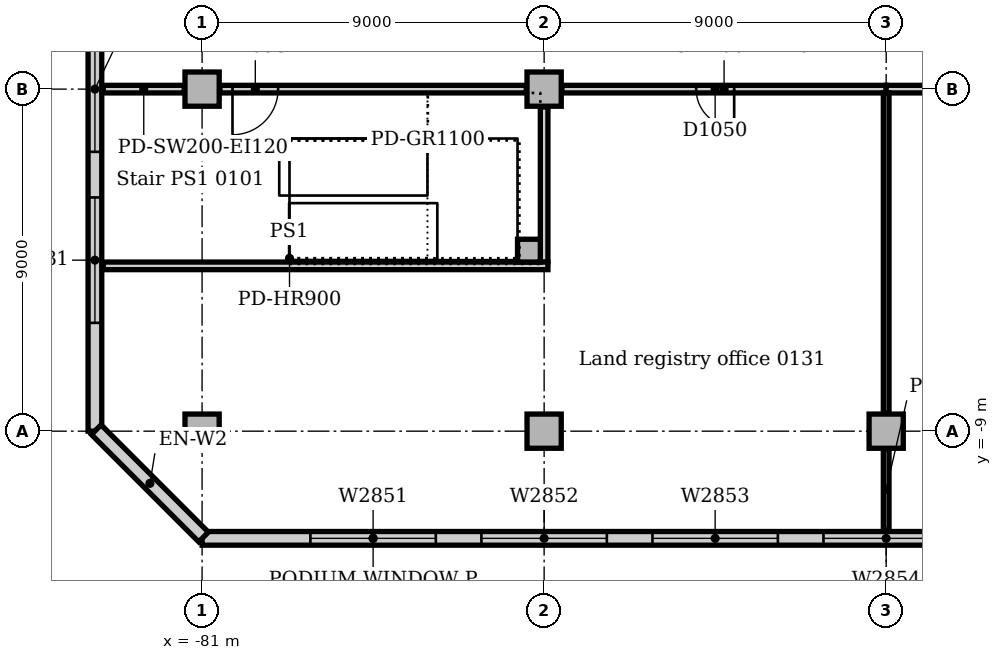
"""IFC4 building model, lengths in metres.
Left out: names, types, materials, properties, quantities, classifications, styles, units other than length and angle.
Written with IfcOpenShell. Run it as: python <this file> out.ifc"""

import sys

from ifc_helpers import new_model, si_unit, direction, frame, frame_2d, origin, origin_2d, place, context, subcontext, project, spatial, rectangle, extrude, element, fill, save


model = new_model("IFC4")
c1 = context("Model", 3, precision=1e-05, world=origin(), true_north=direction((0.0, 1.0)))
c2 = subcontext(c1, "Body", "Model", "MODEL_VIEW")
j1 = project(units=[si_unit("LENGTHUNIT", "METRE"), si_unit("PLANEANGLEUNIT", "RADIAN")], contexts=[c1])
p1 = place(None, origin())
s1 = spatial("IfcSite", under=j1, at=p1, CompositionType="ELEMENT")
p2 = place(p1, origin())
s2 = spatial("IfcBuilding", under=s1, at=p2, CompositionType="ELEMENT")
p3 = place(p2, frame((0.0, 0.0, 6.0)))
s3 = spatial("IfcBuildingStorey", under=s2, at=p3, CompositionType="ELEMENT", Elevation=6.0)
for number, where, z_axis, x_axis in (
    (1, (-81.0, -9.0, 0.0), (0.0, 0.0, 1.0), (1.0, 0.0, 0.0)),
    (2, (-81.0, 0.0, 0.0), (0.0, 0.0, 1.0), (1.0, 0.0, 0.0)),
    (3, (-72.0, -9.0, 0.0), (0.0, 0.0, 1.0), (1.0, 0.0, 0.0)),
    (4, (-72.0, 0.0, 0.0), (0.0, 0.0, 1.0), (1.0, 0.0, 0.0)),
    (5, (-63.0, -9.0, 0.0), (0.0, 0.0, 1.0), (1.0, 0.0, 0.0)),
):
    element("IfcColumn", number, at=place(p3, frame(where, z_axis=z_axis, x_axis=x_axis)), inside=s3, PredefinedType="COLUMN", context=c2, shape_type="SweptSolid", body=[
        extrude(rectangle(XDim=0.9, YDim=0.9, at=origin_2d()), origin(), (0.0, 0.0, 1.0), 4.7),
    ])
p4 = place(p3, frame((-81.0, -11.82, 0.0), z_axis=(0.0, 0.0, 1.0), x_axis=(1.0, 0.0, 0.0)))
e6 = element("IfcWall", 6, at=p4, inside=s3, PredefinedType="STANDARD", context=c2, shape_type="SweptSolid", body=[
    extrude(rectangle(XDim=54.0, YDim=0.36, at=frame_2d((27.0, 0.0))), origin(), (0.0, 0.0, 1.0), 4.7),
])
p5 = place(p4, frame((2.85, 0.0, 0.9)))
e7 = element("IfcOpeningElement", 7, at=p5, cuts=e6, PredefinedType="OPENING", context=c2, shape_type="SweptSolid", body=[
    extrude(rectangle(XDim=3.3, YDim=2.4, at=frame_2d((1.65, 1.2))), frame((0.0, 0.19, 0.0), z_axis=(0.0, -1.0, 0.0), x_axis=(1.0, 0.0, 0.0)), (0.0, 0.0, 1.0), 0.38),
])
p6 = place(p4, frame((7.35, 0.0, 0.9)))
e8 = element("IfcOpeningElement", 8, at=p6, cuts=e6, PredefinedType="OPENING", context=c2, shape_type="SweptSolid", body=[
    extrude(rectangle(XDim=3.3, YDim=2.4, at=frame_2d((1.65, 1.2))), frame((0.0, 0.19, 0.0), z_axis=(0.0, -1.0, 0.0), x_axis=(1.0, 0.0, 0.0)), (0.0, 0.0, 1.0), 0.38),
])
p7 = place(p4, frame((11.85, 0.0, 0.9)))
e9 = element("IfcOpeningElement", 9, at=p7, cuts=e6, PredefinedType="OPENING", context=c2, shape_type="SweptSolid", body=[
    extrude(rectangle(XDim=3.3, YDim=2.4, at=frame_2d((1.65, 1.2))), frame((0.0, 0.19, 0.0), z_axis=(0.0, -1.0, 0.0), x_axis=(1.0, 0.0, 0.0)), (0.0, 0.0, 1.0), 0.38),
])
p8 = place(p4, frame((16.35, 0.0, 0.9)))
e10 = element("IfcOpeningElement", 10, at=p8, cuts=e6, PredefinedType="OPENING", context=c2, shape_type="SweptSolid", body=[
    extrude(rectangle(XDim=3.3, YDim=2.4, at=frame_2d((1.65, 1.2))), frame((0.0, 0.19, 0.0), z_axis=(0.0, -1.0, 0.0), x_axis=(1.0, 0.0, 0.0)), (0.0, 0.0, 1.0), 0.38),
])
p9 = place(p4, frame((20.85, 0.0, 0.9)))
e11 = element("IfcOpeningElement", 11, at=p9, cuts=e6, PredefinedType="OPENING", context=c2, shape_type="SweptSolid", body=[
    extrude(rectangle(XDim=3.3, YDim=2.4, at=frame_2d((1.65, 1.2))), frame((0.0, 0.19, 0.0), z_axis=(0.0, -1.0, 0.0), x_axis=(1.0, 0.0, 0.0)), (0.0, 0.0, 1.0), 0.38),
])
p10 = place(p4, frame((25.35, 0.0, 0.9)))
e12 = element("IfcOpeningElement", 12, at=p10, cuts=e6, PredefinedType="OPENING", context=c2, shape_type="SweptSolid", body=[
    extrude(rectangle(XDim=3.3, YDim=2.4, at=frame_2d((1.65, 1.2))), frame((0.0, 0.19, 0.0), z_axis=(0.0, -1.0, 0.0), x_axis=(1.0, 0.0, 0.0)), (0.0, 0.0, 1.0), 0.38),
])
p11 = place(p4, frame((29.85, 0.0, 0.9)))
e13 = element("IfcOpeningElement", 13, at=p11, cuts=e6, PredefinedType="OPENING", context=c2, shape_type="SweptSolid", body=[
    extrude(rectangle(XDim=3.3, YDim=2.4, at=frame_2d((1.65, 1.2))), frame((0.0, 0.19, 0.0), z_axis=(0.0, -1.0, 0.0), x_axis=(1.0, 0.0, 0.0)), (0.0, 0.0, 1.0), 0.38),
])
p12 = place(p4, frame((34.35, 0.0, 0.9)))
e14 = element("IfcOpeningElement", 14, at=p12, cuts=e6, PredefinedType="OPENING", context=c2, shape_type="SweptSolid", body=[
    extrude(rectangle(XDim=3.3, YDim=2.4, at=frame_2d((1.65, 1.2))), frame((0.0, 0.19, 0.0), z_axis=(0.0, -1.0, 0.0), x_axis=(1.0, 0.0, 0.0)), (0.0, 0.0, 1.0), 0.38),
])
p13 = place(p4, frame((38.85, 0.0, 0.9)))
e15 = element("IfcOpeningElement", 15, at=p13, cuts=e6, PredefinedType="OPENING", context=c2, shape_type="SweptSolid", body=[
    extrude(rectangle(XDim=3.3, YDim=2.4, at=frame_2d((1.65, 1.2))), frame((0.0, 0.19, 0.0), z_axis=(0.0, -1.0, 0.0), x_axis=(1.0, 0.0, 0.0)), (0.0, 0.0, 1.0), 0.38),
])
p14 = place(p4, frame((43.35, 0.0, 0.9)))
e16 = element("IfcOpeningElement", 16, at=p14, cuts=e6, PredefinedType="OPENING", context=c2, shape_type="SweptSolid", body=[
    extrude(rectangle(XDim=3.3, YDim=2.4, at=frame_2d((1.65, 1.2))), frame((0.0, 0.19, 0.0), z_axis=(0.0, -1.0, 0.0), x_axis=(1.0, 0.0, 0.0)), (0.0, 0.0, 1.0), 0.38),
])
p15 = place(p4, frame((47.85, 0.0, 0.9)))
e17 = element("IfcOpeningElement", 17, at=p15, cuts=e6, PredefinedType="OPENING", context=c2, shape_type="SweptSolid", body=[
    extrude(rectangle(XDim=3.3, YDim=2.4, at=frame_2d((1.65, 1.2))), frame((0.0, 0.19, 0.0), z_axis=(0.0, -1.0, 0.0), x_axis=(1.0, 0.0, 0.0)), (0.0, 0.0, 1.0), 0.38),
])
p16 = place(p3, frame((-83.82, 54.0, 0.0), z_axis=(0.0, 0.0, 1.0), x_axis=(0.0, -1.0, 0.0)))
e18 = element("IfcWall", 18, at=p16, inside=s3, PredefinedType="STANDARD", context=c2, shape_type="SweptSolid", body=[
    extrude(rectangle(XDim=63.0, YDim=0.36, at=frame_2d((31.5, 0.0))), origin(), (0.0, 0.0, 1.0), 4.7),
])
p17 = place(p16, frame((2.85, 0.0, 0.9)))
e19 = element("IfcOpeningElement", 19, at=p17, cuts=e18, PredefinedType="OPENING", context=c2, shape_type="SweptSolid", body=[
    extrude(rectangle(XDim=3.3, YDim=2.4, at=frame_2d((1.65, 1.2))), frame((0.0, 0.19, 0.0), z_axis=(0.0, -1.0, 0.0), x_axis=(1.0, 0.0, 0.0)), (0.0, 0.0, 1.0), 0.38),
])
p18 = place(p16, frame((7.35, 0.0, 0.9)))
e20 = element("IfcOpeningElement", 20, at=p18, cuts=e18, PredefinedType="OPENING", context=c2, shape_type="SweptSolid", body=[
    extrude(rectangle(XDim=3.3, YDim=2.4, at=frame_2d((1.65, 1.2))), frame((0.0, 0.19, 0.0), z_axis=(0.0, -1.0, 0.0), x_axis=(1.0, 0.0, 0.0)), (0.0, 0.0, 1.0), 0.38),
])
p19 = place(p16, frame((11.85, 0.0, 0.9)))
e21 = element("IfcOpeningElement", 21, at=p19, cuts=e18, PredefinedType="OPENING", context=c2, shape_type="SweptSolid", body=[
    extrude(rectangle(XDim=3.3, YDim=2.4, at=frame_2d((1.65, 1.2))), frame((0.0, 0.19, 0.0), z_axis=(0.0, -1.0, 0.0), x_axis=(1.0, 0.0, 0.0)), (0.0, 0.0, 1.0), 0.38),
])
p20 = place(p16, frame((16.35, 0.0, 0.9)))
e22 = element("IfcOpeningElement", 22, at=p20, cuts=e18, PredefinedType="OPENING", context=c2, shape_type="SweptSolid", body=[
    extrude(rectangle(XDim=3.3, YDim=2.4, at=frame_2d((1.65, 1.2))), frame((0.0, 0.19, 0.0), z_axis=(0.0, -1.0, 0.0), x_axis=(1.0, 0.0, 0.0)), (0.0, 0.0, 1.0), 0.38),
])
p21 = place(p16, frame((20.85, 0.0, 0.9)))
e23 = element("IfcOpeningElement", 23, at=p21, cuts=e18, PredefinedType="OPENING", context=c2, shape_type="SweptSolid", body=[
    extrude(rectangle(XDim=3.3, YDim=2.4, at=frame_2d((1.65, 1.2))), frame((0.0, 0.19, 0.0), z_axis=(0.0, -1.0, 0.0), x_axis=(1.0, 0.0, 0.0)), (0.0, 0.0, 1.0), 0.38),
])
p22 = place(p16, frame((25.35, 0.0, 0.9)))
e24 = element("IfcOpeningElement", 24, at=p22, cuts=e18, PredefinedType="OPENING", context=c2, shape_type="SweptSolid", body=[
    extrude(rectangle(XDim=3.3, YDim=2.4, at=frame_2d((1.65, 1.2))), frame((0.0, 0.19, 0.0), z_axis=(0.0, -1.0, 0.0), x_axis=(1.0, 0.0, 0.0)), (0.0, 0.0, 1.0), 0.38),
])
p23 = place(p16, frame((29.85, 0.0, 0.9)))
e25 = element("IfcOpeningElement", 25, at=p23, cuts=e18, PredefinedType="OPENING", context=c2, shape_type="SweptSolid", body=[
    extrude(rectangle(XDim=3.3, YDim=2.4, at=frame_2d((1.65, 1.2))), frame((0.0, 0.19, 0.0), z_axis=(0.0, -1.0, 0.0), x_axis=(1.0, 0.0, 0.0)), (0.0, 0.0, 1.0), 0.38),
])
p24 = place(p16, frame((34.35, 0.0, 0.9)))
e26 = element("IfcOpeningElement", 26, at=p24, cuts=e18, PredefinedType="OPENING", context=c2, shape_type="SweptSolid", body=[
    extrude(rectangle(XDim=3.3, YDim=2.4, at=frame_2d((1.65, 1.2))), frame((0.0, 0.19, 0.0), z_axis=(0.0, -1.0, 0.0), x_axis=(1.0, 0.0, 0.0)), (0.0, 0.0, 1.0), 0.38),
])
p25 = place(p16, frame((38.85, 0.0, 0.9)))
e27 = element("IfcOpeningElement", 27, at=p25, cuts=e18, PredefinedType="OPENING", context=c2, shape_type="SweptSolid", body=[
    extrude(rectangle(XDim=3.3, YDim=2.4, at=frame_2d((1.65, 1.2))), frame((0.0, 0.19, 0.0), z_axis=(0.0, -1.0, 0.0), x_axis=(1.0, 0.0, 0.0)), (0.0, 0.0, 1.0), 0.38),
])
p26 = place(p16, frame((43.35, 0.0, 0.9)))
e28 = element("IfcOpeningElement", 28, at=p26, cuts=e18, PredefinedType="OPENING", context=c2, shape_type="SweptSolid", body=[
    extrude(rectangle(XDim=3.3, YDim=2.4, at=frame_2d((1.65, 1.2))), frame((0.0, 0.19, 0.0), z_axis=(0.0, -1.0, 0.0), x_axis=(1.0, 0.0, 0.0)), (0.0, 0.0, 1.0), 0.38),
])
p27 = place(p16, frame((47.85, 0.0, 0.9)))
e29 = element("IfcOpeningElement", 29, at=p27, cuts=e18, PredefinedType="OPENING", context=c2, shape_type="SweptSolid", body=[
    extrude(rectangle(XDim=3.3, YDim=2.4, at=frame_2d((1.65, 1.2))), frame((0.0, 0.19, 0.0), z_axis=(0.0, -1.0, 0.0), x_axis=(1.0, 0.0, 0.0)), (0.0, 0.0, 1.0), 0.38),
])
p28 = place(p16, frame((52.35, 0.0, 0.9)))
e30 = element("IfcOpeningElement", 30, at=p28, cuts=e18, PredefinedType="OPENING", context=c2, shape_type="SweptSolid", body=[
    extrude(rectangle(XDim=3.3, YDim=2.4, at=frame_2d((1.65, 1.2))), frame((0.0, 0.19, 0.0), z_axis=(0.0, -1.0, 0.0), x_axis=(1.0, 0.0, 0.0)), (0.0, 0.0, 1.0), 0.38),
])
p29 = place(p16, frame((56.85, 0.0, 0.9)))
e31 = element("IfcOpeningElement", 31, at=p29, cuts=e18, PredefinedType="OPENING", context=c2, shape_type="SweptSolid", body=[
    extrude(rectangle(XDim=3.3, YDim=2.4, at=frame_2d((1.65, 1.2))), frame((0.0, 0.19, 0.0), z_axis=(0.0, -1.0, 0.0), x_axis=(1.0, 0.0, 0.0)), (0.0, 0.0, 1.0), 0.38),
])
p30 = place(p3, frame((-83.784, -8.961, 0.0), z_axis=(0.0, 0.0, 1.0), x_axis=(0.707106781187, -0.707106781187, 0.0)))
e32 = element("IfcWall", 32, at=p30, inside=s3, PredefinedType="STANDARD", context=c2, shape_type="SweptSolid", body=[
    extrude(rectangle(XDim=3.993, YDim=0.36, at=frame_2d((1.996, 0.0))), origin(), (0.0, 0.0, 1.0), 4.7),
])
p31 = place(p3, frame((-72.4, -4.25, 0.0), z_axis=(0.0, 0.0, 1.0), x_axis=(1.0, 0.0, 0.0)))
e33 = element("IfcColumn", 33, at=p31, inside=s3, PredefinedType="COLUMN", context=c2, shape_type="SweptSolid", body=[
    extrude(rectangle(XDim=0.6, YDim=0.6, at=origin_2d()), origin(), (0.0, 0.0, 1.0), 5.0),
])
p32 = place(p3, frame((-83.6, 0.0, 0.0), z_axis=(0.0, 0.0, 1.0), x_axis=(1.0, 0.0, 0.0)))
e34 = element("IfcWall", 34, at=p32, inside=s3, PredefinedType="SOLIDWALL", context=c2, shape_type="SweptSolid", body=[
    extrude(rectangle(XDim=2.13, YDim=0.2, at=frame_2d((1.065, 0.0))), origin(), (0.0, 0.0, 1.0), 4.7),
])
p33 = place(p3, frame((-80.53, 0.0, 0.0), z_axis=(0.0, 0.0, 1.0), x_axis=(1.0, 0.0, 0.0)))
e35 = element("IfcWall", 35, at=p33, inside=s3, PredefinedType="SOLIDWALL", context=c2, shape_type="SweptSolid", body=[
    extrude(rectangle(XDim=8.06, YDim=0.2, at=frame_2d((4.03, 0.0))), origin(), (0.0, 0.0, 1.0), 4.7),
])
p34 = place(p33, frame((0.33, 0.0, 0.0)))
e36 = element("IfcOpeningElement", 36, at=p34, cuts=e35, PredefinedType="OPENING", context=c2, shape_type="SweptSolid", body=[
    extrude(rectangle(XDim=1.2, YDim=2.1, at=frame_2d((0.6, 1.05))), frame((0.0, 0.11, 0.0), z_axis=(0.0, -1.0, 0.0), x_axis=(1.0, 0.0, 0.0)), (0.0, 0.0, 1.0), 0.22),
])
p35 = place(p3, frame((-72.0, -4.55, 0.0), z_axis=(0.0, 0.0, 1.0), x_axis=(0.0, 1.0, 0.0)))
e37 = element("IfcWall", 37, at=p35, inside=s3, PredefinedType="SOLIDWALL", context=c2, shape_type="SweptSolid", body=[
    extrude(rectangle(XDim=4.08, YDim=0.2, at=frame_2d((2.04, 0.0))), origin(), (0.0, 0.0, 1.0), 4.7),
])
p36 = place(p3, frame((-83.6, -4.65, 0.0), z_axis=(0.0, 0.0, 1.0), x_axis=(1.0, 0.0, 0.0)))
e38 = element("IfcWall", 38, at=p36, inside=s3, PredefinedType="SOLIDWALL", context=c2, shape_type="SweptSolid", body=[
    extrude(rectangle(XDim=11.7, YDim=0.2, at=frame_2d((5.85, 0.0))), origin(), (0.0, 0.0, 1.0), 4.7),
])
p37 = place(p3, frame((-71.53, 0.0, 0.0), z_axis=(0.0, 0.0, 1.0), x_axis=(1.0, 0.0, 0.0)))
e39 = element("IfcWall", 39, at=p37, inside=s3, PredefinedType="PARTITIONING", context=c2, shape_type="SweptSolid", body=[
    extrude(rectangle(XDim=8.53, YDim=0.2, at=frame_2d((4.265, 0.0))), origin(), (0.0, 0.0, 1.0), 4.7),
])
p38 = place(p37, frame((3.53, 0.0, 0.0)))
e40 = element("IfcOpeningElement", 40, at=p38, cuts=e39, PredefinedType="OPENING", context=c2, shape_type="SweptSolid", body=[
    extrude(rectangle(XDim=1.0, YDim=2.1, at=frame_2d((0.5, 1.05))), frame((0.0, 0.11, 0.0), z_axis=(0.0, -1.0, 0.0), x_axis=(1.0, 0.0, 0.0)), (0.0, 0.0, 1.0), 0.22),
])
p39 = place(p3, frame((-63.0, 0.0, 0.0), z_axis=(0.0, 0.0, 1.0), x_axis=(1.0, 0.0, 0.0)))
e41 = element("IfcWall", 41, at=p39, inside=s3, PredefinedType="PARTITIONING", context=c2, shape_type="SweptSolid", body=[
    extrude(rectangle(XDim=9.0, YDim=0.2, at=frame_2d((4.5, 0.0))), origin(), (0.0, 0.0, 1.0), 4.7),
])
p40 = place(p39, frame((4.0, 0.0, 0.0)))
e42 = element("IfcOpeningElement", 42, at=p40, cuts=e41, PredefinedType="OPENING", context=c2, shape_type="SweptSolid", body=[
    extrude(rectangle(XDim=1.0, YDim=2.1, at=frame_2d((0.5, 1.05))), frame((0.0, 0.11, 0.0), z_axis=(0.0, -1.0, 0.0), x_axis=(1.0, 0.0, 0.0)), (0.0, 0.0, 1.0), 0.22),
])
p41 = place(p3, frame((-63.0, -11.6, 0.0), z_axis=(0.0, 0.0, 1.0), x_axis=(0.0, 1.0, 0.0)))
e43 = element("IfcWall", 43, at=p41, inside=s3, PredefinedType="PARTITIONING", context=c2, shape_type="SweptSolid", body=[
    extrude(rectangle(XDim=2.13, YDim=0.15, at=frame_2d((1.065, 0.0))), origin(), (0.0, 0.0, 1.0), 4.7),
])
p42 = place(p3, frame((-63.0, -8.53, 0.0), z_axis=(0.0, 0.0, 1.0), x_axis=(0.0, 1.0, 0.0)))
e44 = element("IfcWall", 44, at=p42, inside=s3, PredefinedType="PARTITIONING", context=c2, shape_type="SweptSolid", body=[
    extrude(rectangle(XDim=8.43, YDim=0.15, at=frame_2d((4.215, 0.0))), origin(), (0.0, 0.0, 1.0), 4.7),
])
p43 = place(p5, origin())
e45 = element("IfcWindow", 45, at=p43, inside=s3, PartitioningType="SINGLE_PANEL", PredefinedType="WINDOW", context=c2, shape_type="SweptSolid", body=[
    extrude(rectangle(XDim=3.3, YDim=2.4, at=frame_2d((1.65, 1.2))), frame((0.0, 0.13, 0.0), z_axis=(0.0, -1.0, 0.0), x_axis=(1.0, 0.0, 0.0)), (0.0, 0.0, 1.0), 0.06),
])
fill(e7, e45)
p44 = place(p6, origin())
e46 = element("IfcWindow", 46, at=p44, inside=s3, PartitioningType="SINGLE_PANEL", PredefinedType="WINDOW", context=c2, shape_type="SweptSolid", body=[
    extrude(rectangle(XDim=3.3, YDim=2.4, at=frame_2d((1.65, 1.2))), frame((0.0, 0.13, 0.0), z_axis=(0.0, -1.0, 0.0), x_axis=(1.0, 0.0, 0.0)), (0.0, 0.0, 1.0), 0.06),
])
fill(e8, e46)
p45 = place(p7, origin())
e47 = element("IfcWindow", 47, at=p45, inside=s3, PartitioningType="SINGLE_PANEL", PredefinedType="WINDOW", context=c2, shape_type="SweptSolid", body=[
    extrude(rectangle(XDim=3.3, YDim=2.4, at=frame_2d((1.65, 1.2))), frame((0.0, 0.13, 0.0), z_axis=(0.0, -1.0, 0.0), x_axis=(1.0, 0.0, 0.0)), (0.0, 0.0, 1.0), 0.06),
])
fill(e9, e47)
p46 = place(p8, origin())
e48 = element("IfcWindow", 48, at=p46, inside=s3, PartitioningType="SINGLE_PANEL", PredefinedType="WINDOW", context=c2, shape_type="SweptSolid", body=[
    extrude(rectangle(XDim=3.3, YDim=2.4, at=frame_2d((1.65, 1.2))), frame((0.0, 0.13, 0.0), z_axis=(0.0, -1.0, 0.0), x_axis=(1.0, 0.0, 0.0)), (0.0, 0.0, 1.0), 0.06),
])
fill(e10, e48)
p47 = place(p28, origin())
e49 = element("IfcWindow", 49, at=p47, inside=s3, PartitioningType="SINGLE_PANEL", PredefinedType="WINDOW", context=c2, shape_type="SweptSolid", body=[
    extrude(rectangle(XDim=3.3, YDim=2.4, at=frame_2d((1.65, 1.2))), frame((0.0, 0.13, 0.0), z_axis=(0.0, -1.0, 0.0), x_axis=(1.0, 0.0, 0.0)), (0.0, 0.0, 1.0), 0.06),
])
fill(e30, e49)
p48 = place(p29, origin())
e50 = element("IfcWindow", 50, at=p48, inside=s3, PartitioningType="SINGLE_PANEL", PredefinedType="WINDOW", context=c2, shape_type="SweptSolid", body=[
    extrude(rectangle(XDim=3.3, YDim=2.4, at=frame_2d((1.65, 1.2))), frame((0.0, 0.13, 0.0), z_axis=(0.0, -1.0, 0.0), x_axis=(1.0, 0.0, 0.0)), (0.0, 0.0, 1.0), 0.06),
])
fill(e31, e50)
p49 = place(p38, frame((1.0, 0.0, 0.0), z_axis=(0.0, 0.0, 1.0), x_axis=(-1.0, 0.0, 0.0)))
e51 = element("IfcDoor", 51, at=p49, inside=s3, OperationType="SINGLE_SWING_LEFT", PredefinedType="DOOR", context=c2, shape_type="SweptSolid", body=[
    extrude(rectangle(XDim=1.0, YDim=2.1, at=frame_2d((0.5, 1.05))), frame((0.0, 0.025, 0.0), z_axis=(0.0, -1.0, 0.0), x_axis=(1.0, 0.0, 0.0)), (0.0, 0.0, 1.0), 0.05),
])
fill(e40, e51)
p50 = place(p34, frame((1.2, 0.0, 0.0), z_axis=(0.0, 0.0, 1.0), x_axis=(-1.0, 0.0, 0.0)))
e52 = element("IfcDoor", 52, at=p50, inside=s3, OperationType="SINGLE_SWING_RIGHT", PredefinedType="DOOR", context=c2, shape_type="SweptSolid", body=[
    extrude(rectangle(XDim=1.2, YDim=2.1, at=frame_2d((0.6, 1.05))), frame((0.0, 0.025, 0.0), z_axis=(0.0, -1.0, 0.0), x_axis=(1.0, 0.0, 0.0)), (0.0, 0.0, 1.0), 0.05),
])
fill(e36, e52)
save(model, sys.argv[1])
